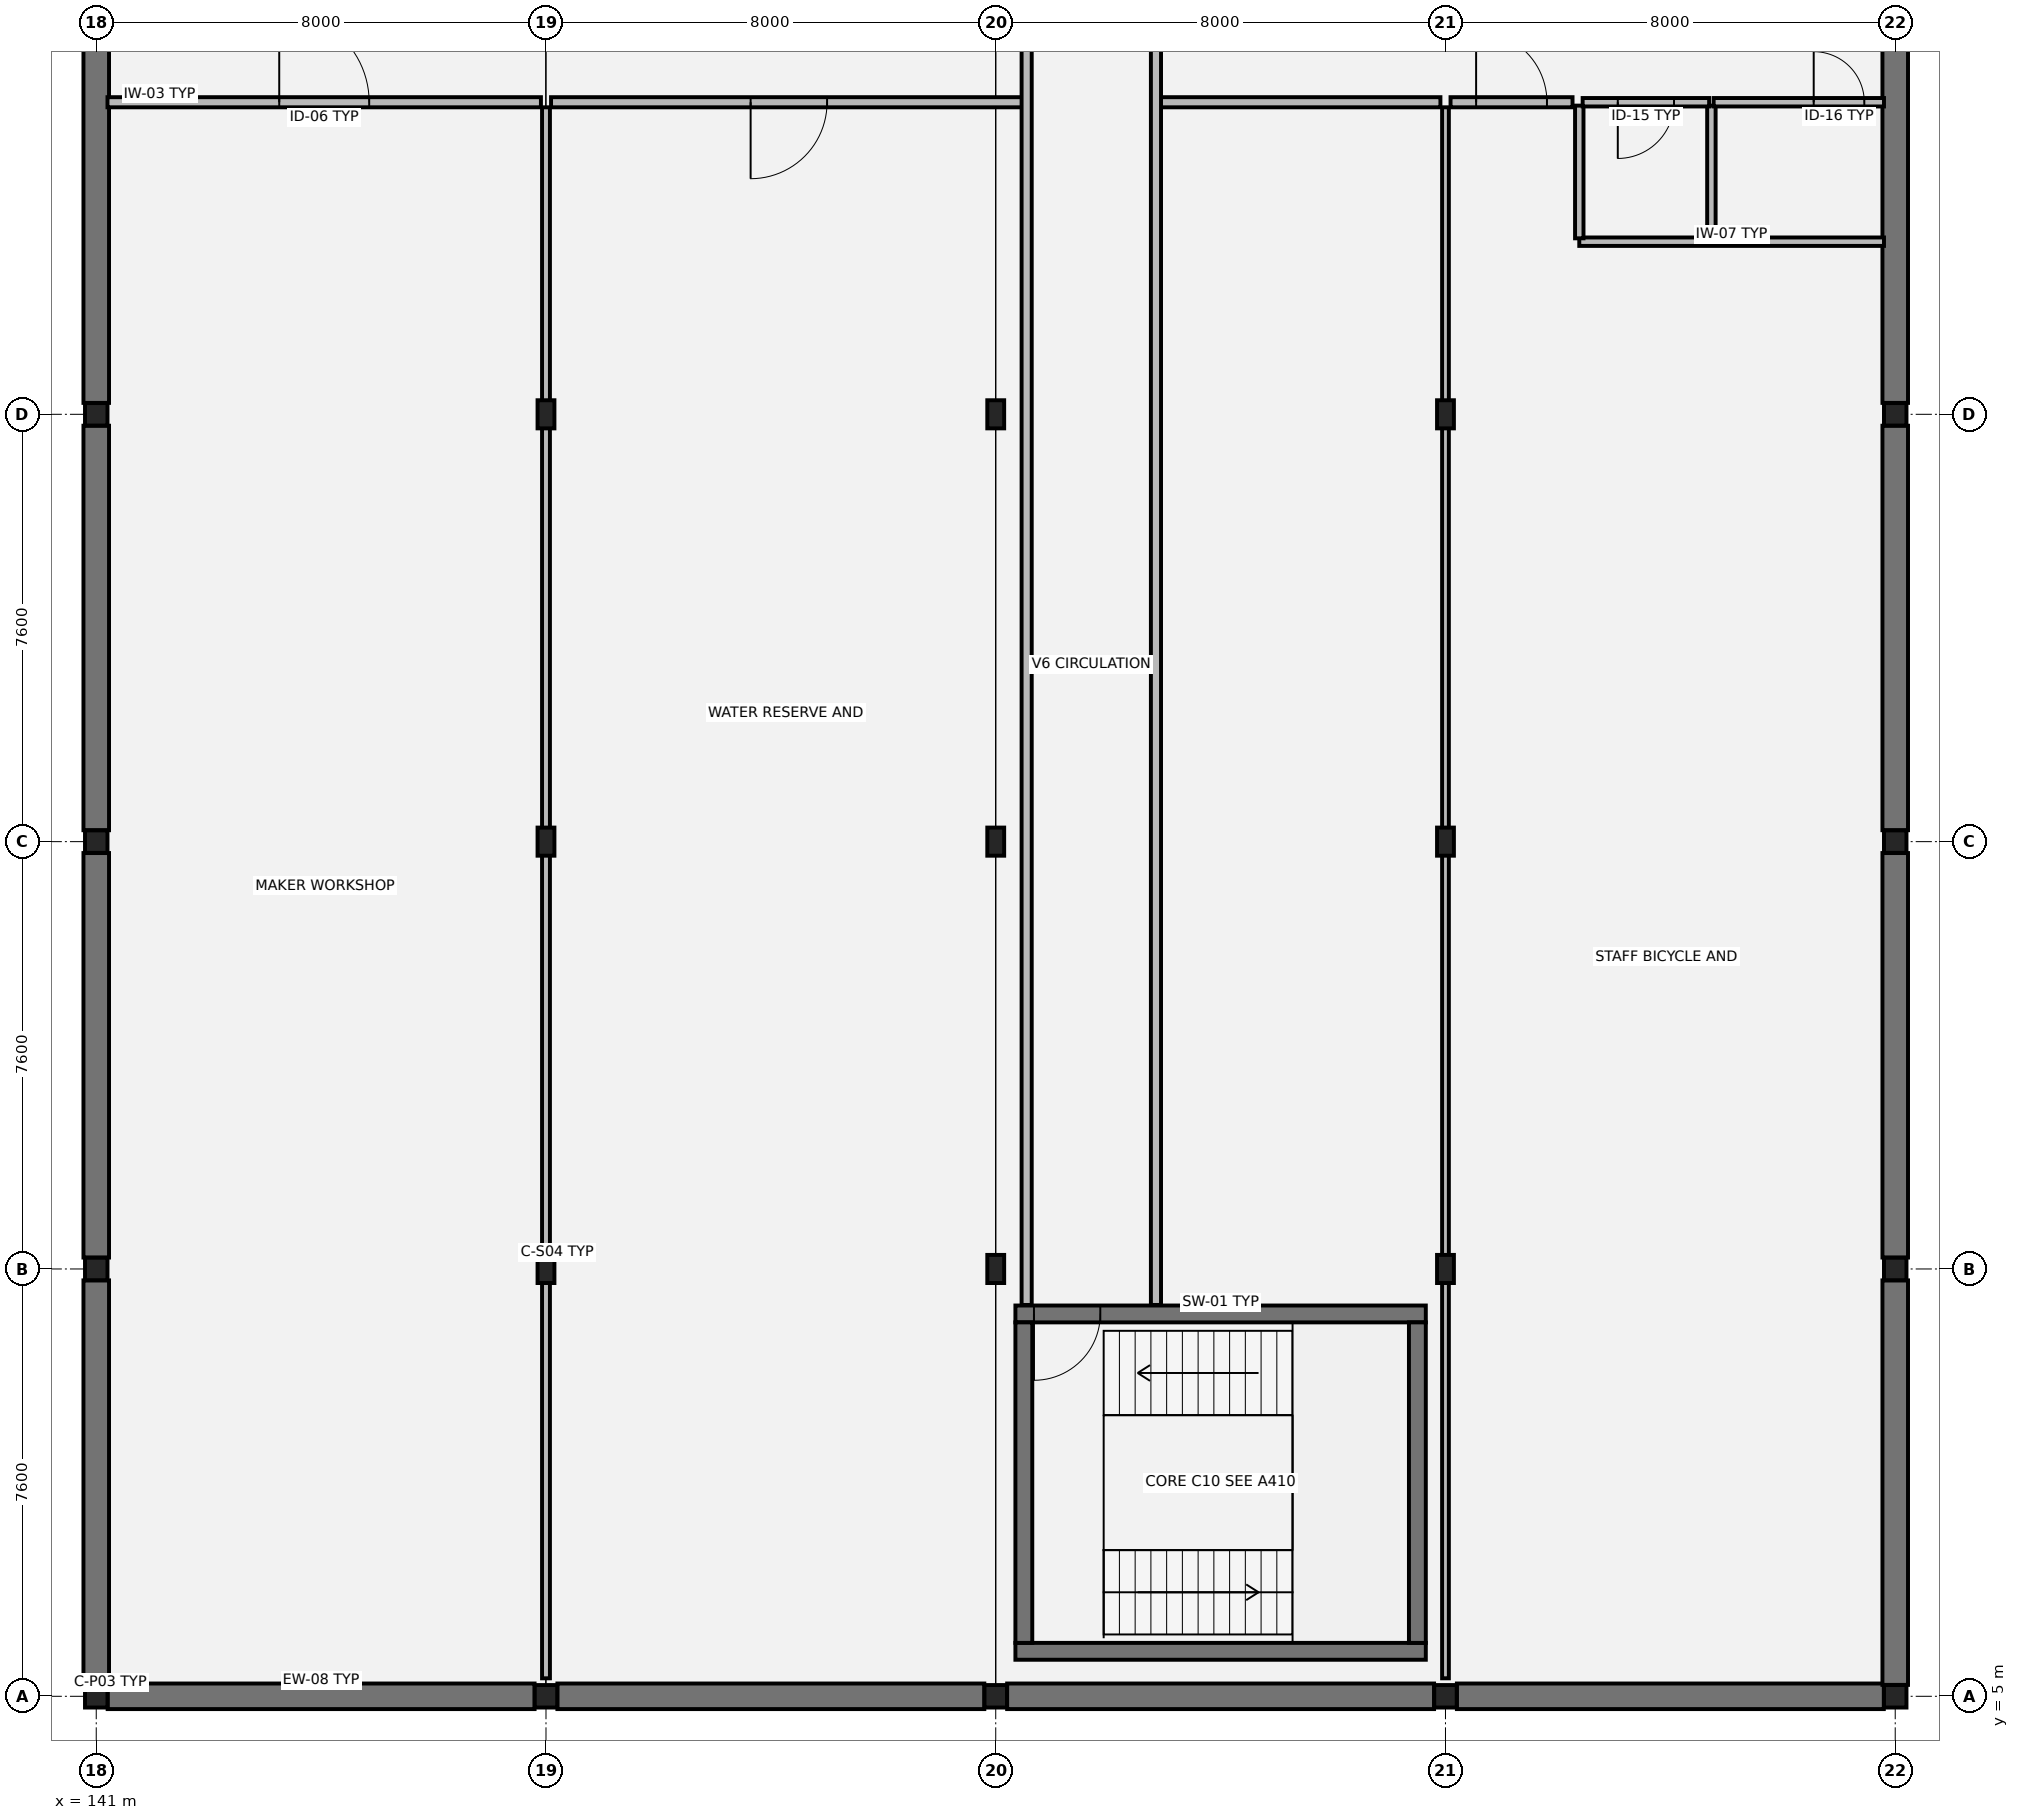
"""IFC4 building model, lengths in metres.
Left out: names, types, materials, properties, quantities, classifications, styles, units other than length and angle.
Written with IfcOpenShell. Run it as: python <this file> out.ifc"""

import sys

from ifc_helpers import new_model, si_unit, direction, frame, frame_2d, origin, origin_2d, place, context, subcontext, project, spatial, rectangle, hollow_rectangle, i_section, extrude, element, fill, save


model = new_model("IFC4")
c1 = context("Model", 3, precision=1e-05, world=origin(), true_north=direction((0.0, 1.0)))
c2 = subcontext(c1, "Body", "Model", "MODEL_VIEW")
j1 = project(units=[si_unit("LENGTHUNIT", "METRE"), si_unit("PLANEANGLEUNIT", "RADIAN")], contexts=[c1])
p1 = place(None, origin())
s1 = spatial("IfcSite", under=j1, at=p1, CompositionType="ELEMENT")
p2 = place(p1, origin())
s2 = spatial("IfcBuilding", under=s1, at=p2, CompositionType="ELEMENT")
p3 = place(p2, frame((0.0, 0.0, -4.42)))
s3 = spatial("IfcBuildingStorey", under=s2, at=p3, CompositionType="ELEMENT", Elevation=-4.42)
for number, where, z_axis, x_axis in (
    (1, (141.0, 5.0, 0.0), (0.0, 0.0, 1.0), (1.0, 0.0, 0.0)),
    (2, (141.0, 12.6, 0.0), (0.0, 0.0, 1.0), (1.0, 0.0, 0.0)),
    (3, (141.0, 20.2, 0.0), (0.0, 0.0, 1.0), (1.0, 0.0, 0.0)),
    (4, (141.0, 27.8, 0.0), (0.0, 0.0, 1.0), (1.0, 0.0, 0.0)),
    (5, (149.0, 5.0, 0.0), (0.0, 0.0, 1.0), (1.0, 0.0, 0.0)),
):
    element("IfcColumn", number, at=place(p3, frame(where, z_axis=z_axis, x_axis=x_axis)), inside=s3, PredefinedType="COLUMN", context=c2, shape_type="SweptSolid", body=[
        extrude(hollow_rectangle(XDim=0.4, YDim=0.4, WallThickness=0.016, at=origin_2d()), origin(), (0.0, 0.0, 1.0), 4.395),
    ])
for number, where, z_axis, x_axis in (
    (6, (149.0, 12.6, 0.0), (0.0, 0.0, 1.0), (1.0, 0.0, 0.0)),
    (7, (149.0, 20.2, 0.0), (0.0, 0.0, 1.0), (1.0, 0.0, 0.0)),
    (8, (149.0, 27.8, 0.0), (0.0, 0.0, 1.0), (1.0, 0.0, 0.0)),
):
    element("IfcColumn", number, at=place(p3, frame(where, z_axis=z_axis, x_axis=x_axis)), inside=s3, PredefinedType="COLUMN", context=c2, shape_type="SweptSolid", body=[
        extrude(i_section(OverallWidth=0.3, OverallDepth=0.5, WebThickness=0.014, FlangeThickness=0.028, at=origin_2d()), origin(), (0.0, 0.0, 1.0), 4.395),
    ])
p4 = place(p3, frame((157.0, 5.0, 0.0), z_axis=(0.0, 0.0, 1.0), x_axis=(1.0, 0.0, 0.0)))
e9 = element("IfcColumn", 9, at=p4, inside=s3, PredefinedType="COLUMN", context=c2, shape_type="SweptSolid", body=[
    extrude(hollow_rectangle(XDim=0.4, YDim=0.4, WallThickness=0.016, at=origin_2d()), origin(), (0.0, 0.0, 1.0), 4.395),
])
for number, where, z_axis, x_axis in (
    (10, (157.0, 12.6, 0.0), (0.0, 0.0, 1.0), (1.0, 0.0, 0.0)),
    (11, (157.0, 20.2, 0.0), (0.0, 0.0, 1.0), (1.0, 0.0, 0.0)),
    (12, (157.0, 27.8, 0.0), (0.0, 0.0, 1.0), (1.0, 0.0, 0.0)),
):
    element("IfcColumn", number, at=place(p3, frame(where, z_axis=z_axis, x_axis=x_axis)), inside=s3, PredefinedType="COLUMN", context=c2, shape_type="SweptSolid", body=[
        extrude(i_section(OverallWidth=0.3, OverallDepth=0.5, WebThickness=0.014, FlangeThickness=0.028, at=origin_2d()), origin(), (0.0, 0.0, 1.0), 4.395),
    ])
p5 = place(p3, frame((165.0, 5.0, 0.0), z_axis=(0.0, 0.0, 1.0), x_axis=(1.0, 0.0, 0.0)))
e13 = element("IfcColumn", 13, at=p5, inside=s3, PredefinedType="COLUMN", context=c2, shape_type="SweptSolid", body=[
    extrude(hollow_rectangle(XDim=0.4, YDim=0.4, WallThickness=0.016, at=origin_2d()), origin(), (0.0, 0.0, 1.0), 4.395),
])
for number, where, z_axis, x_axis in (
    (14, (165.0, 12.6, 0.0), (0.0, 0.0, 1.0), (1.0, 0.0, 0.0)),
    (15, (165.0, 20.2, 0.0), (0.0, 0.0, 1.0), (1.0, 0.0, 0.0)),
    (16, (165.0, 27.8, 0.0), (0.0, 0.0, 1.0), (1.0, 0.0, 0.0)),
):
    element("IfcColumn", number, at=place(p3, frame(where, z_axis=z_axis, x_axis=x_axis)), inside=s3, PredefinedType="COLUMN", context=c2, shape_type="SweptSolid", body=[
        extrude(i_section(OverallWidth=0.3, OverallDepth=0.5, WebThickness=0.014, FlangeThickness=0.028, at=origin_2d()), origin(), (0.0, 0.0, 1.0), 4.395),
    ])
for number, where, z_axis, x_axis in (
    (17, (173.0, 5.0, 0.0), (0.0, 0.0, 1.0), (1.0, 0.0, 0.0)),
    (18, (173.0, 12.6, 0.0), (0.0, 0.0, 1.0), (1.0, 0.0, 0.0)),
    (19, (173.0, 20.2, 0.0), (0.0, 0.0, 1.0), (1.0, 0.0, 0.0)),
    (20, (173.0, 27.8, 0.0), (0.0, 0.0, 1.0), (1.0, 0.0, 0.0)),
):
    element("IfcColumn", number, at=place(p3, frame(where, z_axis=z_axis, x_axis=x_axis)), inside=s3, PredefinedType="COLUMN", context=c2, shape_type="SweptSolid", body=[
        extrude(hollow_rectangle(XDim=0.4, YDim=0.4, WallThickness=0.016, at=origin_2d()), origin(), (0.0, 0.0, 1.0), 4.395),
    ])
for number, where, z_axis, x_axis in (
    (21, (141.203, 5.0, 0.0), (0.0, 0.0, 1.0), (1.0, 0.0, 0.0)),
    (22, (149.203, 5.0, 0.0), (0.0, 0.0, 1.0), (1.0, 0.0, 0.0)),
    (23, (157.203, 5.0, 0.0), (0.0, 0.0, 1.0), (1.0, 0.0, 0.0)),
    (24, (165.203, 5.0, 0.0), (0.0, 0.0, 1.0), (1.0, 0.0, 0.0)),
):
    element("IfcWall", number, at=place(p3, frame(where, z_axis=z_axis, x_axis=x_axis)), inside=s3, PredefinedType="USERDEFINED", context=c2, shape_type="SweptSolid", body=[
        extrude(rectangle(XDim=7.594, YDim=0.455, at=frame_2d((3.797, 0.0))), origin(), (0.0, 0.0, 1.0), 3.82),
    ])
for number, where, z_axis, x_axis in (
    (25, (141.0, 5.203, 0.0), (0.0, 0.0, 1.0), (0.0, 1.0, 0.0)),
    (26, (173.0, 5.203, 0.0), (0.0, 0.0, 1.0), (0.0, 1.0, 0.0)),
    (27, (141.0, 12.803, 0.0), (0.0, 0.0, 1.0), (0.0, 1.0, 0.0)),
    (28, (173.0, 12.803, 0.0), (0.0, 0.0, 1.0), (0.0, 1.0, 0.0)),
):
    element("IfcWall", number, at=place(p3, frame(where, z_axis=z_axis, x_axis=x_axis)), inside=s3, PredefinedType="USERDEFINED", context=c2, shape_type="SweptSolid", body=[
        extrude(rectangle(XDim=7.194, YDim=0.455, at=frame_2d((3.597, 0.0))), origin(), (0.0, 0.0, 1.0), 3.82),
    ])
for number, where, z_axis, x_axis in (
    (29, (141.0, 20.403, 0.0), (0.0, 0.0, 1.0), (0.0, 1.0, 0.0)),
    (30, (173.0, 20.403, 0.0), (0.0, 0.0, 1.0), (0.0, 1.0, 0.0)),
):
    element("IfcWall", number, at=place(p3, frame(where, z_axis=z_axis, x_axis=x_axis)), inside=s3, PredefinedType="USERDEFINED", context=c2, shape_type="SweptSolid", body=[
        extrude(rectangle(XDim=7.194, YDim=0.455, at=frame_2d((3.597, 0.0))), origin(), (0.0, 0.0, 1.0), 3.82),
    ])
for number, where, z_axis, x_axis in (
    (31, (141.0, 28.003, 0.0), (0.0, 0.0, 1.0), (0.0, 1.0, 0.0)),
    (32, (173.0, 28.003, 0.0), (0.0, 0.0, 1.0), (0.0, 1.0, 0.0)),
):
    element("IfcWall", number, at=place(p3, frame(where, z_axis=z_axis, x_axis=x_axis)), inside=s3, PredefinedType="USERDEFINED", context=c2, shape_type="SweptSolid", body=[
        extrude(rectangle(XDim=7.194, YDim=0.455, at=frame_2d((3.597, 0.0))), origin(), (0.0, 0.0, 1.0), 3.82),
    ])
p6 = place(p3, frame((157.35, 5.8, 0.0), z_axis=(0.0, 0.0, 1.0), x_axis=(1.0, 0.0, 0.0)))
e33 = element("IfcWall", 33, at=p6, inside=s3, PredefinedType="SHEAR", context=c2, shape_type="SweptSolid", body=[
    extrude(rectangle(XDim=7.3, YDim=0.3, at=frame_2d((3.65, 0.0))), origin(), (0.0, 0.0, 1.0), 4.185),
])
p7 = place(p3, frame((157.35, 11.8, 0.0), z_axis=(0.0, 0.0, 1.0), x_axis=(1.0, 0.0, 0.0)))
e34 = element("IfcWall", 34, at=p7, inside=s3, PredefinedType="SHEAR", context=c2, shape_type="SweptSolid", body=[
    extrude(rectangle(XDim=7.3, YDim=0.3, at=frame_2d((3.65, 0.0))), origin(), (0.0, 0.0, 1.0), 4.185),
])
p8 = place(p7, frame((0.33, 0.0, 0.0)))
e35 = element("IfcOpeningElement", 35, at=p8, cuts=e34, PredefinedType="OPENING", context=c2, shape_type="SweptSolid", body=[
    extrude(rectangle(XDim=1.18, YDim=2.18, at=frame_2d((0.59, 1.09))), frame((0.0, 0.16, 0.0), z_axis=(0.0, -1.0, 0.0), x_axis=(1.0, 0.0, 0.0)), (0.0, 0.0, 1.0), 0.32),
])
for number, where, z_axis, x_axis in (
    (36, (157.5, 5.95, 0.0), (0.0, 0.0, 1.0), (0.0, 1.0, 0.0)),
    (37, (164.5, 5.95, 0.0), (0.0, 0.0, 1.0), (0.0, 1.0, 0.0)),
):
    element("IfcWall", number, at=place(p3, frame(where, z_axis=z_axis, x_axis=x_axis)), inside=s3, PredefinedType="SHEAR", context=c2, shape_type="SweptSolid", body=[
        extrude(rectangle(XDim=5.7, YDim=0.3, at=frame_2d((2.85, 0.0))), origin(), (0.0, 0.0, 1.0), 4.185),
    ])
p9 = place(p3, frame((167.38, 30.87, 0.0), z_axis=(0.0, 0.0, 1.0), x_axis=(1.0, 0.0, 0.0)))
e38 = element("IfcWall", 38, at=p9, inside=s3, PredefinedType="PARTITIONING", context=c2, shape_type="SweptSolid", body=[
    extrude(rectangle(XDim=5.42, YDim=0.15, at=frame_2d((2.71, 0.0))), origin(), (0.0, 0.0, 1.0), 3.52),
])
for number, where, z_axis, x_axis in (
    (39, (167.38, 30.93, 0.0), (0.0, 0.0, 1.0), (0.0, 1.0, 0.0)),
    (40, (169.73, 30.93, 0.0), (0.0, 0.0, 1.0), (0.0, 1.0, 0.0)),
):
    element("IfcWall", number, at=place(p3, frame(where, z_axis=z_axis, x_axis=x_axis)), inside=s3, PredefinedType="PARTITIONING", context=c2, shape_type="SweptSolid", body=[
        extrude(rectangle(XDim=2.36, YDim=0.15, at=frame_2d((1.18, 0.0))), origin(), (0.0, 0.0, 1.0), 3.52),
    ])
p10 = place(p3, frame((167.44, 33.35, 0.0), z_axis=(0.0, 0.0, 1.0), x_axis=(1.0, 0.0, 0.0)))
e41 = element("IfcWall", 41, at=p10, inside=s3, PredefinedType="PARTITIONING", context=c2, shape_type="SweptSolid", body=[
    extrude(rectangle(XDim=2.25, YDim=0.15, at=frame_2d((1.125, 0.0))), origin(), (0.0, 0.0, 1.0), 3.52),
])
p11 = place(p10, frame((0.625, 0.0, 0.0)))
e42 = element("IfcOpeningElement", 42, at=p11, cuts=e41, PredefinedType="OPENING", context=c2, shape_type="SweptSolid", body=[
    extrude(rectangle(XDim=1.0, YDim=2.15, at=frame_2d((0.5, 1.075))), frame((0.0, 0.085, 0.0), z_axis=(0.0, -1.0, 0.0), x_axis=(1.0, 0.0, 0.0)), (0.0, 0.0, 1.0), 0.17),
])
p12 = place(p3, frame((169.77, 33.35, 0.0), z_axis=(0.0, 0.0, 1.0), x_axis=(1.0, 0.0, 0.0)))
e43 = element("IfcWall", 43, at=p12, inside=s3, PredefinedType="PARTITIONING", context=c2, shape_type="SweptSolid", body=[
    extrude(rectangle(XDim=3.03, YDim=0.15, at=frame_2d((1.515, 0.0))), origin(), (0.0, 0.0, 1.0), 3.52),
])
p13 = place(p12, frame((1.78, 0.0, 0.0)))
e44 = element("IfcOpeningElement", 44, at=p13, cuts=e43, PredefinedType="OPENING", context=c2, shape_type="SweptSolid", body=[
    extrude(rectangle(XDim=0.9, YDim=2.15, at=frame_2d((0.45, 1.075))), frame((0.0, 0.085, 0.0), z_axis=(0.0, -1.0, 0.0), x_axis=(1.0, 0.0, 0.0)), (0.0, 0.0, 1.0), 0.17),
])
p14 = place(p3, frame((141.2, 33.35, 0.0), z_axis=(0.0, 0.0, 1.0), x_axis=(1.0, 0.0, 0.0)))
e45 = element("IfcWall", 45, at=p14, inside=s3, PredefinedType="PARTITIONING", context=c2, shape_type="SweptSolid", body=[
    extrude(rectangle(XDim=7.71, YDim=0.18, at=frame_2d((3.855, 0.0))), origin(), (0.0, 0.0, 1.0), 3.52),
])
p15 = place(p14, frame((3.055, 0.0, 0.0)))
e46 = element("IfcOpeningElement", 46, at=p15, cuts=e45, PredefinedType="OPENING", context=c2, shape_type="SweptSolid", body=[
    extrude(rectangle(XDim=1.6, YDim=2.25, at=frame_2d((0.8, 1.125))), frame((0.0, 0.1, 0.0), z_axis=(0.0, -1.0, 0.0), x_axis=(1.0, 0.0, 0.0)), (0.0, 0.0, 1.0), 0.2),
])
p16 = place(p3, frame((149.09, 33.35, 0.0), z_axis=(0.0, 0.0, 1.0), x_axis=(1.0, 0.0, 0.0)))
e47 = element("IfcWall", 47, at=p16, inside=s3, PredefinedType="PARTITIONING", context=c2, shape_type="SweptSolid", body=[
    extrude(rectangle(XDim=8.46, YDim=0.18, at=frame_2d((4.23, 0.0))), origin(), (0.0, 0.0, 1.0), 3.52),
])
p17 = place(p16, frame((3.55, 0.0, 0.0)))
e48 = element("IfcOpeningElement", 48, at=p17, cuts=e47, PredefinedType="OPENING", context=c2, shape_type="SweptSolid", body=[
    extrude(rectangle(XDim=1.36, YDim=2.2, at=frame_2d((0.68, 1.1))), frame((0.0, 0.1, 0.0), z_axis=(0.0, -1.0, 0.0), x_axis=(1.0, 0.0, 0.0)), (0.0, 0.0, 1.0), 0.2),
])
p18 = place(p3, frame((159.85, 33.35, 0.0), z_axis=(0.0, 0.0, 1.0), x_axis=(1.0, 0.0, 0.0)))
e49 = element("IfcWall", 49, at=p18, inside=s3, PredefinedType="PARTITIONING", context=c2, shape_type="SweptSolid", body=[
    extrude(rectangle(XDim=5.06, YDim=0.18, at=frame_2d((2.53, 0.0))), origin(), (0.0, 0.0, 1.0), 3.52),
])
p19 = place(p3, frame((165.09, 33.35, 0.0), z_axis=(0.0, 0.0, 1.0), x_axis=(1.0, 0.0, 0.0)))
e50 = element("IfcWall", 50, at=p19, inside=s3, PredefinedType="PARTITIONING", context=c2, shape_type="SweptSolid", body=[
    extrude(rectangle(XDim=2.17, YDim=0.18, at=frame_2d((1.085, 0.0))), origin(), (0.0, 0.0, 1.0), 3.52),
])
p20 = place(p19, frame((0.455, 0.0, 0.0)))
e51 = element("IfcOpeningElement", 51, at=p20, cuts=e50, PredefinedType="OPENING", context=c2, shape_type="SweptSolid", body=[
    extrude(rectangle(XDim=1.26, YDim=2.2, at=frame_2d((0.63, 1.1))), frame((0.0, 0.1, 0.0), z_axis=(0.0, -1.0, 0.0), x_axis=(1.0, 0.0, 0.0)), (0.0, 0.0, 1.0), 0.2),
])
for number, where, z_axis, x_axis in (
    (52, (157.55, 11.96, 0.0), (0.0, 0.0, 1.0), (0.0, 1.0, 0.0)),
    (53, (159.85, 11.96, 0.0), (0.0, 0.0, 1.0), (0.0, 1.0, 0.0)),
):
    element("IfcWall", number, at=place(p3, frame(where, z_axis=z_axis, x_axis=x_axis)), inside=s3, PredefinedType="PARTITIONING", context=c2, shape_type="SweptSolid", body=[
        extrude(rectangle(XDim=24.08, YDim=0.18, at=frame_2d((12.04, 0.0))), origin(), (0.0, 0.0, 1.0), 3.52),
    ])
p21 = place(p3, frame((149.0, 5.32, 0.0), z_axis=(0.0, 0.0, 1.0), x_axis=(0.0, 1.0, 0.0)))
e54 = element("IfcWall", 54, at=p21, inside=s3, PredefinedType="PARTITIONING", context=c2, shape_type="SweptSolid", body=[
    extrude(rectangle(XDim=27.94, YDim=0.14, at=frame_2d((13.97, 0.0))), origin(), (0.0, 0.0, 1.0), 3.52),
])
p22 = place(p3, frame((165.0, 5.32, 0.0), z_axis=(0.0, 0.0, 1.0), x_axis=(0.0, 1.0, 0.0)))
e55 = element("IfcWall", 55, at=p22, inside=s3, PredefinedType="PARTITIONING", context=c2, shape_type="SweptSolid", body=[
    extrude(rectangle(XDim=27.94, YDim=0.12, at=frame_2d((13.97, 0.0))), origin(), (0.0, 0.0, 1.0), 3.52),
])
p23 = place(p8, origin())
e56 = element("IfcDoor", 56, at=p23, inside=s3, OperationType="SINGLE_SWING_RIGHT", PredefinedType="DOOR", context=c2, shape_type="SweptSolid", body=[
    extrude(rectangle(XDim=1.18, YDim=2.18, at=frame_2d((0.59, 1.09))), frame((0.0, 0.025, 0.0), z_axis=(0.0, -1.0, 0.0), x_axis=(1.0, 0.0, 0.0)), (0.0, 0.0, 1.0), 0.05),
])
fill(e35, e56)
p24 = place(p11, origin())
e57 = element("IfcDoor", 57, at=p24, inside=s3, OperationType="SINGLE_SWING_RIGHT", PredefinedType="DOOR", context=c2, shape_type="SweptSolid", body=[
    extrude(rectangle(XDim=1.0, YDim=2.15, at=frame_2d((0.5, 1.075))), frame((0.0, 0.025, 0.0), z_axis=(0.0, -1.0, 0.0), x_axis=(1.0, 0.0, 0.0)), (0.0, 0.0, 1.0), 0.05),
])
fill(e42, e57)
p25 = place(p13, origin())
e58 = element("IfcDoor", 58, at=p25, inside=s3, OperationType="SINGLE_SWING_LEFT", PredefinedType="DOOR", context=c2, shape_type="SweptSolid", body=[
    extrude(rectangle(XDim=0.9, YDim=2.15, at=frame_2d((0.45, 1.075))), frame((0.0, 0.025, 0.0), z_axis=(0.0, -1.0, 0.0), x_axis=(1.0, 0.0, 0.0)), (0.0, 0.0, 1.0), 0.05),
])
fill(e44, e58)
p26 = place(p15, origin())
e59 = element("IfcDoor", 59, at=p26, inside=s3, OperationType="DOUBLE_DOOR_SINGLE_SWING", PredefinedType="DOOR", context=c2, shape_type="SweptSolid", body=[
    extrude(rectangle(XDim=1.6, YDim=2.25, at=frame_2d((0.8, 1.125))), frame((0.0, 0.025, 0.0), z_axis=(0.0, -1.0, 0.0), x_axis=(1.0, 0.0, 0.0)), (0.0, 0.0, 1.0), 0.05),
])
fill(e46, e59)
p27 = place(p17, origin())
e60 = element("IfcDoor", 60, at=p27, inside=s3, OperationType="SINGLE_SWING_RIGHT", PredefinedType="DOOR", context=c2, shape_type="SweptSolid", body=[
    extrude(rectangle(XDim=1.36, YDim=2.2, at=frame_2d((0.68, 1.1))), frame((0.0, 0.025, 0.0), z_axis=(0.0, -1.0, 0.0), x_axis=(1.0, 0.0, 0.0)), (0.0, 0.0, 1.0), 0.05),
])
fill(e48, e60)
p28 = place(p20, origin())
e61 = element("IfcDoor", 61, at=p28, inside=s3, OperationType="SINGLE_SWING_LEFT", PredefinedType="DOOR", context=c2, shape_type="SweptSolid", body=[
    extrude(rectangle(XDim=1.26, YDim=2.2, at=frame_2d((0.63, 1.1))), frame((0.0, 0.025, 0.0), z_axis=(0.0, -1.0, 0.0), x_axis=(1.0, 0.0, 0.0)), (0.0, 0.0, 1.0), 0.05),
])
fill(e51, e61)
save(model, sys.argv[1])
